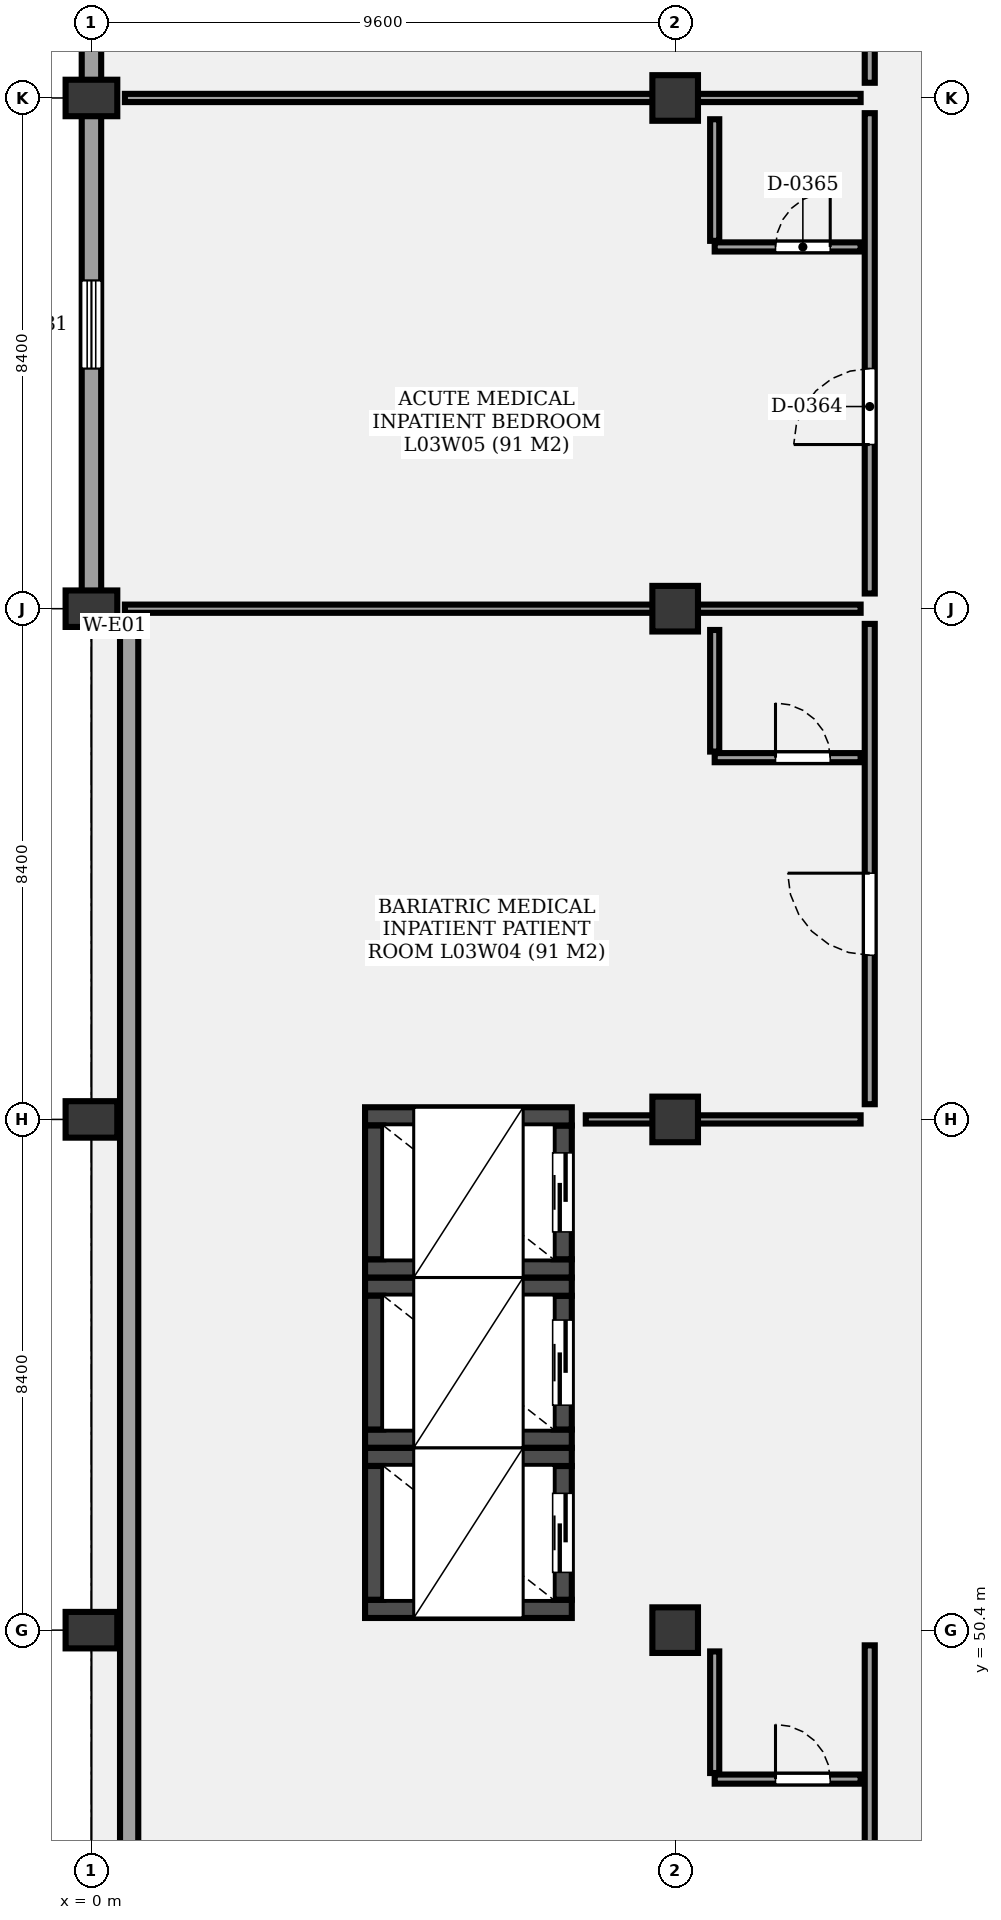
"""IFC4 building model, lengths in metres.
Left out: names, types, materials, properties, quantities, classifications, styles, units other than length and angle.
Written with IfcOpenShell. Run it as: python <this file> out.ifc"""

import sys

from ifc_helpers import new_model, si_unit, direction, frame, frame_2d, origin, origin_2d, place, context, subcontext, project, spatial, rectangle, extrude, element, fill, save


model = new_model("IFC4")
c1 = context("Model", 3, precision=1e-05, world=origin(), true_north=direction((0.0, 1.0)))
c2 = subcontext(c1, "Body", "Model", "MODEL_VIEW")
j1 = project(units=[si_unit("LENGTHUNIT", "METRE"), si_unit("PLANEANGLEUNIT", "RADIAN")], contexts=[c1])
p1 = place(None, origin())
s1 = spatial("IfcSite", under=j1, at=p1, CompositionType="ELEMENT")
p2 = place(p1, origin())
s2 = spatial("IfcBuilding", under=s1, at=p2, CompositionType="ELEMENT")
p3 = place(p2, frame((0.0, 0.0, 13.5)))
s3 = spatial("IfcBuildingStorey", under=s2, at=p3, CompositionType="ELEMENT", Elevation=13.5)
for number, where, z_axis, x_axis in (
    (1, (0.0, 50.4, 0.0), (0.0, 0.0, 1.0), (1.0, 0.0, 0.0)),
    (2, (0.0, 58.8, 0.0), (0.0, 0.0, 1.0), (1.0, 0.0, 0.0)),
    (3, (0.0, 67.2, 0.0), (0.0, 0.0, 1.0), (1.0, 0.0, 0.0)),
    (4, (0.0, 75.6, 0.0), (0.0, 0.0, 1.0), (1.0, 0.0, 0.0)),
):
    element("IfcColumn", number, at=place(p3, frame(where, z_axis=z_axis, x_axis=x_axis)), inside=s3, PredefinedType="COLUMN", context=c2, shape_type="SweptSolid", body=[
        extrude(rectangle(XDim=0.85, YDim=0.6, at=origin_2d()), origin(), (0.0, 0.0, 1.0), 4.3),
    ])
for number, where, z_axis, x_axis in (
    (5, (9.6, 50.4, 0.0), (0.0, 0.0, 1.0), (1.0, 0.0, 0.0)),
    (6, (9.6, 58.8, 0.0), (0.0, 0.0, 1.0), (1.0, 0.0, 0.0)),
    (7, (9.6, 67.2, 0.0), (0.0, 0.0, 1.0), (1.0, 0.0, 0.0)),
    (8, (9.6, 75.6, 0.0), (0.0, 0.0, 1.0), (1.0, 0.0, 0.0)),
):
    element("IfcColumn", number, at=place(p3, frame(where, z_axis=z_axis, x_axis=x_axis)), inside=s3, PredefinedType="COLUMN", context=c2, shape_type="SweptSolid", body=[
        extrude(rectangle(XDim=0.75, YDim=0.75, at=origin_2d()), origin(), (0.0, 0.0, 1.0), 4.3),
    ])
p4 = place(p3, frame((4.5, 50.75, 0.0), z_axis=(0.0, 0.0, 1.0), x_axis=(1.0, 0.0, 0.0)))
e9 = element("IfcWall", 9, at=p4, inside=s3, PredefinedType="SHEAR", context=c2, shape_type="SweptSolid", body=[
    extrude(rectangle(XDim=3.4, YDim=0.3, at=frame_2d((1.7, 0.0))), origin(), (0.0, 0.0, 1.0), 4.3),
])
p5 = place(p3, frame((7.75, 50.9, 0.0), z_axis=(0.0, 0.0, 1.0), x_axis=(0.0, 1.0, 0.0)))
e10 = element("IfcWall", 10, at=p5, inside=s3, PredefinedType="SHEAR", context=c2, shape_type="SweptSolid", body=[
    extrude(rectangle(XDim=2.2, YDim=0.3, at=frame_2d((1.1, 0.0))), origin(), (0.0, 0.0, 1.0), 4.3),
])
p6 = place(p5, frame((0.45, 0.0, 0.0)))
e11 = element("IfcOpeningElement", 11, at=p6, cuts=e10, PredefinedType="OPENING", context=c2, shape_type="SweptSolid", body=[
    extrude(rectangle(XDim=1.3, YDim=2.3, at=frame_2d((0.65, 1.15))), frame((0.0, 0.16, 0.0), z_axis=(0.0, -1.0, 0.0), x_axis=(1.0, 0.0, 0.0)), (0.0, 0.0, 1.0), 0.32),
])
p7 = place(p3, frame((7.9, 53.25, 0.0), z_axis=(0.0, 0.0, 1.0), x_axis=(-1.0, 0.0, 0.0)))
e12 = element("IfcWall", 12, at=p7, inside=s3, PredefinedType="SHEAR", context=c2, shape_type="SweptSolid", body=[
    extrude(rectangle(XDim=3.4, YDim=0.3, at=frame_2d((1.7, 0.0))), origin(), (0.0, 0.0, 1.0), 4.3),
])
p8 = place(p3, frame((4.65, 53.1, 0.0), z_axis=(0.0, 0.0, 1.0), x_axis=(0.0, -1.0, 0.0)))
e13 = element("IfcWall", 13, at=p8, inside=s3, PredefinedType="SHEAR", context=c2, shape_type="SweptSolid", body=[
    extrude(rectangle(XDim=2.2, YDim=0.3, at=frame_2d((1.1, 0.0))), origin(), (0.0, 0.0, 1.0), 4.3),
])
p9 = place(p3, frame((4.5, 53.55, 0.0), z_axis=(0.0, 0.0, 1.0), x_axis=(1.0, 0.0, 0.0)))
e14 = element("IfcWall", 14, at=p9, inside=s3, PredefinedType="SHEAR", context=c2, shape_type="SweptSolid", body=[
    extrude(rectangle(XDim=3.4, YDim=0.3, at=frame_2d((1.7, 0.0))), origin(), (0.0, 0.0, 1.0), 4.3),
])
p10 = place(p3, frame((7.75, 53.7, 0.0), z_axis=(0.0, 0.0, 1.0), x_axis=(0.0, 1.0, 0.0)))
e15 = element("IfcWall", 15, at=p10, inside=s3, PredefinedType="SHEAR", context=c2, shape_type="SweptSolid", body=[
    extrude(rectangle(XDim=2.2, YDim=0.3, at=frame_2d((1.1, 0.0))), origin(), (0.0, 0.0, 1.0), 4.3),
])
p11 = place(p10, frame((0.4, 0.0, 0.0)))
e16 = element("IfcOpeningElement", 16, at=p11, cuts=e15, PredefinedType="OPENING", context=c2, shape_type="SweptSolid", body=[
    extrude(rectangle(XDim=1.4, YDim=2.3, at=frame_2d((0.7, 1.15))), frame((0.0, 0.16, 0.0), z_axis=(0.0, -1.0, 0.0), x_axis=(1.0, 0.0, 0.0)), (0.0, 0.0, 1.0), 0.32),
])
p12 = place(p3, frame((7.9, 56.05, 0.0), z_axis=(0.0, 0.0, 1.0), x_axis=(-1.0, 0.0, 0.0)))
e17 = element("IfcWall", 17, at=p12, inside=s3, PredefinedType="SHEAR", context=c2, shape_type="SweptSolid", body=[
    extrude(rectangle(XDim=3.4, YDim=0.3, at=frame_2d((1.7, 0.0))), origin(), (0.0, 0.0, 1.0), 4.3),
])
p13 = place(p3, frame((4.65, 55.9, 0.0), z_axis=(0.0, 0.0, 1.0), x_axis=(0.0, -1.0, 0.0)))
e18 = element("IfcWall", 18, at=p13, inside=s3, PredefinedType="SHEAR", context=c2, shape_type="SweptSolid", body=[
    extrude(rectangle(XDim=2.2, YDim=0.3, at=frame_2d((1.1, 0.0))), origin(), (0.0, 0.0, 1.0), 4.3),
])
p14 = place(p3, frame((4.5, 56.35, 0.0), z_axis=(0.0, 0.0, 1.0), x_axis=(1.0, 0.0, 0.0)))
e19 = element("IfcWall", 19, at=p14, inside=s3, PredefinedType="SHEAR", context=c2, shape_type="SweptSolid", body=[
    extrude(rectangle(XDim=3.4, YDim=0.3, at=frame_2d((1.7, 0.0))), origin(), (0.0, 0.0, 1.0), 4.3),
])
p15 = place(p3, frame((7.75, 56.5, 0.0), z_axis=(0.0, 0.0, 1.0), x_axis=(0.0, 1.0, 0.0)))
e20 = element("IfcWall", 20, at=p15, inside=s3, PredefinedType="SHEAR", context=c2, shape_type="SweptSolid", body=[
    extrude(rectangle(XDim=2.2, YDim=0.3, at=frame_2d((1.1, 0.0))), origin(), (0.0, 0.0, 1.0), 4.3),
])
p16 = place(p15, frame((0.45, 0.0, 0.0)))
e21 = element("IfcOpeningElement", 21, at=p16, cuts=e20, PredefinedType="OPENING", context=c2, shape_type="SweptSolid", body=[
    extrude(rectangle(XDim=1.3, YDim=2.3, at=frame_2d((0.65, 1.15))), frame((0.0, 0.16, 0.0), z_axis=(0.0, -1.0, 0.0), x_axis=(1.0, 0.0, 0.0)), (0.0, 0.0, 1.0), 0.32),
])
p17 = place(p3, frame((7.9, 58.85, 0.0), z_axis=(0.0, 0.0, 1.0), x_axis=(-1.0, 0.0, 0.0)))
e22 = element("IfcWall", 22, at=p17, inside=s3, PredefinedType="SHEAR", context=c2, shape_type="SweptSolid", body=[
    extrude(rectangle(XDim=3.4, YDim=0.3, at=frame_2d((1.7, 0.0))), origin(), (0.0, 0.0, 1.0), 4.3),
])
p18 = place(p3, frame((4.65, 58.7, 0.0), z_axis=(0.0, 0.0, 1.0), x_axis=(0.0, -1.0, 0.0)))
e23 = element("IfcWall", 23, at=p18, inside=s3, PredefinedType="SHEAR", context=c2, shape_type="SweptSolid", body=[
    extrude(rectangle(XDim=2.2, YDim=0.3, at=frame_2d((1.1, 0.0))), origin(), (0.0, 0.0, 1.0), 4.3),
])
p19 = place(p3, frame((0.2, 66.92, 0.0), z_axis=(0.0, 0.0, 1.0), x_axis=(1.0, 0.0, 0.0)))
e24 = element("IfcWall", 24, at=p19, inside=s3, PredefinedType="SOLIDWALL", context=c2, shape_type="SweptSolid", body=[
    extrude(rectangle(XDim=0.36, YDim=0.26, at=frame_2d((0.18, 0.0))), origin(), (0.0, 0.0, 1.0), 3.49),
])
p20 = place(p3, frame((0.62, 34.18, 0.0), z_axis=(0.0, 0.0, 1.0), x_axis=(0.0, 1.0, 0.0)))
e25 = element("IfcWall", 25, at=p20, inside=s3, PredefinedType="SOLIDWALL", context=c2, shape_type="SweptSolid", body=[
    extrude(rectangle(XDim=32.6, YDim=0.3, at=frame_2d((16.3, 0.0))), origin(), (0.0, 0.0, 1.0), 3.49),
])
p21 = place(p3, frame((0.0, 67.2, 0.0), z_axis=(0.0, 0.0, 1.0), x_axis=(0.0, 1.0, 0.0)))
e26 = element("IfcWall", 26, at=p21, inside=s3, PredefinedType="SOLIDWALL", context=c2, shape_type="SweptSolid", body=[
    extrude(rectangle(XDim=16.64, YDim=0.32, at=frame_2d((8.32, 0.0))), origin(), (0.0, 0.0, 1.0), 3.49),
])
p22 = place(p21, frame((3.949, 0.0, 0.85)))
e27 = element("IfcOpeningElement", 27, at=p22, cuts=e26, PredefinedType="OPENING", context=c2, shape_type="SweptSolid", body=[
    extrude(rectangle(XDim=1.45, YDim=1.2, at=frame_2d((0.725, 0.6))), frame((0.0, 0.17, 0.0), z_axis=(0.0, -1.0, 0.0), x_axis=(1.0, 0.0, 0.0)), (0.0, 0.0, 1.0), 0.34),
])
p23 = place(p21, frame((11.241, 0.0, 0.85)))
e28 = element("IfcOpeningElement", 28, at=p23, cuts=e26, PredefinedType="OPENING", context=c2, shape_type="SweptSolid", body=[
    extrude(rectangle(XDim=1.45, YDim=1.2, at=frame_2d((0.725, 0.6))), frame((0.0, 0.17, 0.0), z_axis=(0.0, -1.0, 0.0), x_axis=(1.0, 0.0, 0.0)), (0.0, 0.0, 1.0), 0.34),
])
p24 = place(p3, frame((12.8, 42.25, 0.0), z_axis=(0.0, 0.0, 1.0), x_axis=(0.0, 1.0, 0.0)))
e29 = element("IfcWall", 29, at=p24, inside=s3, PredefinedType="PARTITIONING", context=c2, shape_type="SweptSolid", body=[
    extrude(rectangle(XDim=7.9, YDim=0.165, at=frame_2d((3.95, 0.0))), origin(), (0.0, 0.0, 1.0), 3.4),
])
p25 = place(p24, frame((2.45, 0.0, 0.0)))
e30 = element("IfcOpeningElement", 30, at=p25, cuts=e29, PredefinedType="OPENING", context=c2, shape_type="SweptSolid", body=[
    extrude(rectangle(XDim=1.35, YDim=2.4, at=frame_2d((0.675, 1.2))), frame((0.0, 0.093, 0.0), z_axis=(0.0, -1.0, 0.0), x_axis=(1.0, 0.0, 0.0)), (0.0, 0.0, 1.0), 0.185),
])
p26 = place(p3, frame((10.25, 47.95, 0.0), z_axis=(0.0, 0.0, 1.0), x_axis=(1.0, 0.0, 0.0)))
e31 = element("IfcWall", 31, at=p26, inside=s3, PredefinedType="PARTITIONING", context=c2, shape_type="SweptSolid", body=[
    extrude(rectangle(XDim=2.4, YDim=0.15, at=frame_2d((1.2, 0.0))), origin(), (0.0, 0.0, 1.0), 3.4),
])
p27 = place(p26, frame((1.0, 0.0, 0.0)))
e32 = element("IfcOpeningElement", 32, at=p27, cuts=e31, PredefinedType="OPENING", context=c2, shape_type="SweptSolid", body=[
    extrude(rectangle(XDim=0.9, YDim=2.1, at=frame_2d((0.45, 1.05))), frame((0.0, 0.085, 0.0), z_axis=(0.0, -1.0, 0.0), x_axis=(1.0, 0.0, 0.0)), (0.0, 0.0, 1.0), 0.17),
])
p28 = place(p3, frame((10.25, 48.05, 0.0), z_axis=(0.0, 0.0, 1.0), x_axis=(0.0, 1.0, 0.0)))
e33 = element("IfcWall", 33, at=p28, inside=s3, PredefinedType="PARTITIONING", context=c2, shape_type="SweptSolid", body=[
    extrude(rectangle(XDim=2.0, YDim=0.15, at=frame_2d((1.0, 0.0))), origin(), (0.0, 0.0, 1.0), 3.4),
])
p29 = place(p3, frame((12.8, 59.05, 0.0), z_axis=(0.0, 0.0, 1.0), x_axis=(0.0, 1.0, 0.0)))
e34 = element("IfcWall", 34, at=p29, inside=s3, PredefinedType="PARTITIONING", context=c2, shape_type="SweptSolid", body=[
    extrude(rectangle(XDim=7.9, YDim=0.165, at=frame_2d((3.95, 0.0))), origin(), (0.0, 0.0, 1.0), 3.4),
])
p30 = place(p29, frame((2.45, 0.0, 0.0)))
e35 = element("IfcOpeningElement", 35, at=p30, cuts=e34, PredefinedType="OPENING", context=c2, shape_type="SweptSolid", body=[
    extrude(rectangle(XDim=1.35, YDim=2.4, at=frame_2d((0.675, 1.2))), frame((0.0, 0.093, 0.0), z_axis=(0.0, -1.0, 0.0), x_axis=(1.0, 0.0, 0.0)), (0.0, 0.0, 1.0), 0.185),
])
p31 = place(p3, frame((10.25, 64.75, 0.0), z_axis=(0.0, 0.0, 1.0), x_axis=(1.0, 0.0, 0.0)))
e36 = element("IfcWall", 36, at=p31, inside=s3, PredefinedType="PARTITIONING", context=c2, shape_type="SweptSolid", body=[
    extrude(rectangle(XDim=2.4, YDim=0.15, at=frame_2d((1.2, 0.0))), origin(), (0.0, 0.0, 1.0), 3.4),
])
p32 = place(p31, frame((1.0, 0.0, 0.0)))
e37 = element("IfcOpeningElement", 37, at=p32, cuts=e36, PredefinedType="OPENING", context=c2, shape_type="SweptSolid", body=[
    extrude(rectangle(XDim=0.9, YDim=2.1, at=frame_2d((0.45, 1.05))), frame((0.0, 0.085, 0.0), z_axis=(0.0, -1.0, 0.0), x_axis=(1.0, 0.0, 0.0)), (0.0, 0.0, 1.0), 0.17),
])
p33 = place(p3, frame((10.25, 64.85, 0.0), z_axis=(0.0, 0.0, 1.0), x_axis=(0.0, 1.0, 0.0)))
e38 = element("IfcWall", 38, at=p33, inside=s3, PredefinedType="PARTITIONING", context=c2, shape_type="SweptSolid", body=[
    extrude(rectangle(XDim=2.0, YDim=0.15, at=frame_2d((1.0, 0.0))), origin(), (0.0, 0.0, 1.0), 3.4),
])
p34 = place(p3, frame((8.13, 58.8, 0.0), z_axis=(0.0, 0.0, 1.0), x_axis=(1.0, 0.0, 0.0)))
e39 = element("IfcWall", 39, at=p34, inside=s3, PredefinedType="PARTITIONING", context=c2, shape_type="SweptSolid", body=[
    extrude(rectangle(XDim=4.52, YDim=0.135, at=frame_2d((2.26, 0.0))), origin(), (0.0, 0.0, 1.0), 3.4),
])
p35 = place(p3, frame((12.8, 67.45, 0.0), z_axis=(0.0, 0.0, 1.0), x_axis=(0.0, 1.0, 0.0)))
e40 = element("IfcWall", 40, at=p35, inside=s3, PredefinedType="PARTITIONING", context=c2, shape_type="SweptSolid", body=[
    extrude(rectangle(XDim=7.9, YDim=0.165, at=frame_2d((3.95, 0.0))), origin(), (0.0, 0.0, 1.0), 3.4),
])
p36 = place(p35, frame((2.45, 0.0, 0.0)))
e41 = element("IfcOpeningElement", 41, at=p36, cuts=e40, PredefinedType="OPENING", context=c2, shape_type="SweptSolid", body=[
    extrude(rectangle(XDim=1.25, YDim=2.2, at=frame_2d((0.625, 1.1))), frame((0.0, 0.093, 0.0), z_axis=(0.0, -1.0, 0.0), x_axis=(1.0, 0.0, 0.0)), (0.0, 0.0, 1.0), 0.185),
])
p37 = place(p3, frame((10.25, 73.15, 0.0), z_axis=(0.0, 0.0, 1.0), x_axis=(1.0, 0.0, 0.0)))
e42 = element("IfcWall", 42, at=p37, inside=s3, PredefinedType="PARTITIONING", context=c2, shape_type="SweptSolid", body=[
    extrude(rectangle(XDim=2.4, YDim=0.15, at=frame_2d((1.2, 0.0))), origin(), (0.0, 0.0, 1.0), 3.4),
])
p38 = place(p37, frame((1.0, 0.0, 0.0)))
e43 = element("IfcOpeningElement", 43, at=p38, cuts=e42, PredefinedType="OPENING", context=c2, shape_type="SweptSolid", body=[
    extrude(rectangle(XDim=0.9, YDim=2.1, at=frame_2d((0.45, 1.05))), frame((0.0, 0.085, 0.0), z_axis=(0.0, -1.0, 0.0), x_axis=(1.0, 0.0, 0.0)), (0.0, 0.0, 1.0), 0.17),
])
p39 = place(p3, frame((10.25, 73.25, 0.0), z_axis=(0.0, 0.0, 1.0), x_axis=(0.0, 1.0, 0.0)))
e44 = element("IfcWall", 44, at=p39, inside=s3, PredefinedType="PARTITIONING", context=c2, shape_type="SweptSolid", body=[
    extrude(rectangle(XDim=2.0, YDim=0.15, at=frame_2d((1.0, 0.0))), origin(), (0.0, 0.0, 1.0), 3.4),
])
p40 = place(p3, frame((0.55, 67.2, 0.0), z_axis=(0.0, 0.0, 1.0), x_axis=(1.0, 0.0, 0.0)))
e45 = element("IfcWall", 45, at=p40, inside=s3, PredefinedType="PARTITIONING", context=c2, shape_type="SweptSolid", body=[
    extrude(rectangle(XDim=12.1, YDim=0.135, at=frame_2d((6.05, 0.0))), origin(), (0.0, 0.0, 1.0), 3.4),
])
p41 = place(p3, frame((12.8, 75.85, 0.0), z_axis=(0.0, 0.0, 1.0), x_axis=(0.0, 1.0, 0.0)))
e46 = element("IfcWall", 46, at=p41, inside=s3, PredefinedType="PARTITIONING", context=c2, shape_type="SweptSolid", body=[
    extrude(rectangle(XDim=7.9, YDim=0.165, at=frame_2d((3.95, 0.0))), origin(), (0.0, 0.0, 1.0), 3.4),
])
p42 = place(p41, frame((2.45, 0.0, 0.0)))
e47 = element("IfcOpeningElement", 47, at=p42, cuts=e46, PredefinedType="OPENING", context=c2, shape_type="SweptSolid", body=[
    extrude(rectangle(XDim=1.35, YDim=2.4, at=frame_2d((0.675, 1.2))), frame((0.0, 0.093, 0.0), z_axis=(0.0, -1.0, 0.0), x_axis=(1.0, 0.0, 0.0)), (0.0, 0.0, 1.0), 0.185),
])
p43 = place(p3, frame((0.55, 75.6, 0.0), z_axis=(0.0, 0.0, 1.0), x_axis=(1.0, 0.0, 0.0)))
e48 = element("IfcWall", 48, at=p43, inside=s3, PredefinedType="PARTITIONING", context=c2, shape_type="SweptSolid", body=[
    extrude(rectangle(XDim=12.1, YDim=0.135, at=frame_2d((6.05, 0.0))), origin(), (0.0, 0.0, 1.0), 3.4),
])
p44 = place(p6, origin())
e49 = element("IfcDoor", 49, at=p44, inside=s3, OperationType="SLIDING_TO_RIGHT", PredefinedType="DOOR", context=c2, shape_type="SweptSolid", body=[
    extrude(rectangle(XDim=1.3, YDim=2.3, at=frame_2d((0.65, 1.15))), frame((0.0, 0.025, 0.0), z_axis=(0.0, -1.0, 0.0), x_axis=(1.0, 0.0, 0.0)), (0.0, 0.0, 1.0), 0.05),
])
fill(e11, e49)
p45 = place(p11, origin())
e50 = element("IfcDoor", 50, at=p45, inside=s3, OperationType="SLIDING_TO_LEFT", PredefinedType="DOOR", context=c2, shape_type="SweptSolid", body=[
    extrude(rectangle(XDim=1.4, YDim=2.3, at=frame_2d((0.7, 1.15))), frame((0.0, 0.025, 0.0), z_axis=(0.0, -1.0, 0.0), x_axis=(1.0, 0.0, 0.0)), (0.0, 0.0, 1.0), 0.05),
])
fill(e16, e50)
p46 = place(p16, origin())
e51 = element("IfcDoor", 51, at=p46, inside=s3, OperationType="SLIDING_TO_RIGHT", PredefinedType="DOOR", context=c2, shape_type="SweptSolid", body=[
    extrude(rectangle(XDim=1.3, YDim=2.3, at=frame_2d((0.65, 1.15))), frame((0.0, 0.025, 0.0), z_axis=(0.0, -1.0, 0.0), x_axis=(1.0, 0.0, 0.0)), (0.0, 0.0, 1.0), 0.05),
])
fill(e21, e51)
p47 = place(p22, origin())
e52 = element("IfcWindow", 52, at=p47, inside=s3, PartitioningType="SINGLE_PANEL", PredefinedType="WINDOW", context=c2, shape_type="SweptSolid", body=[
    extrude(rectangle(XDim=1.45, YDim=1.2, at=frame_2d((0.725, 0.6))), frame((0.0, 0.03, 0.0), z_axis=(0.0, -1.0, 0.0), x_axis=(1.0, 0.0, 0.0)), (0.0, 0.0, 1.0), 0.06),
])
fill(e27, e52)
p48 = place(p27, origin())
e53 = element("IfcDoor", 53, at=p48, inside=s3, OperationType="SINGLE_SWING_LEFT", PredefinedType="DOOR", context=c2, shape_type="SweptSolid", body=[
    extrude(rectangle(XDim=0.9, YDim=2.1, at=frame_2d((0.45, 1.05))), frame((0.0, 0.025, 0.0), z_axis=(0.0, -1.0, 0.0), x_axis=(1.0, 0.0, 0.0)), (0.0, 0.0, 1.0), 0.05),
])
fill(e32, e53)
p49 = place(p30, origin())
e54 = element("IfcDoor", 54, at=p49, inside=s3, OperationType="SINGLE_SWING_RIGHT", PredefinedType="DOOR", context=c2, shape_type="SweptSolid", body=[
    extrude(rectangle(XDim=1.35, YDim=2.4, at=frame_2d((0.675, 1.2))), frame((0.0, 0.025, 0.0), z_axis=(0.0, -1.0, 0.0), x_axis=(1.0, 0.0, 0.0)), (0.0, 0.0, 1.0), 0.05),
])
fill(e35, e54)
p50 = place(p32, origin())
e55 = element("IfcDoor", 55, at=p50, inside=s3, OperationType="SINGLE_SWING_LEFT", PredefinedType="DOOR", context=c2, shape_type="SweptSolid", body=[
    extrude(rectangle(XDim=0.9, YDim=2.1, at=frame_2d((0.45, 1.05))), frame((0.0, 0.025, 0.0), z_axis=(0.0, -1.0, 0.0), x_axis=(1.0, 0.0, 0.0)), (0.0, 0.0, 1.0), 0.05),
])
fill(e37, e55)
p51 = place(p36, origin())
e56 = element("IfcDoor", 56, at=p51, inside=s3, OperationType="SINGLE_SWING_LEFT", PredefinedType="DOOR", context=c2, shape_type="SweptSolid", body=[
    extrude(rectangle(XDim=1.25, YDim=2.2, at=frame_2d((0.625, 1.1))), frame((0.0, 0.025, 0.0), z_axis=(0.0, -1.0, 0.0), x_axis=(1.0, 0.0, 0.0)), (0.0, 0.0, 1.0), 0.05),
])
fill(e41, e56)
p52 = place(p38, origin())
e57 = element("IfcDoor", 57, at=p52, inside=s3, OperationType="SINGLE_SWING_RIGHT", PredefinedType="DOOR", context=c2, shape_type="SweptSolid", body=[
    extrude(rectangle(XDim=0.9, YDim=2.1, at=frame_2d((0.45, 1.05))), frame((0.0, 0.025, 0.0), z_axis=(0.0, -1.0, 0.0), x_axis=(1.0, 0.0, 0.0)), (0.0, 0.0, 1.0), 0.05),
])
fill(e43, e57)
save(model, sys.argv[1])
